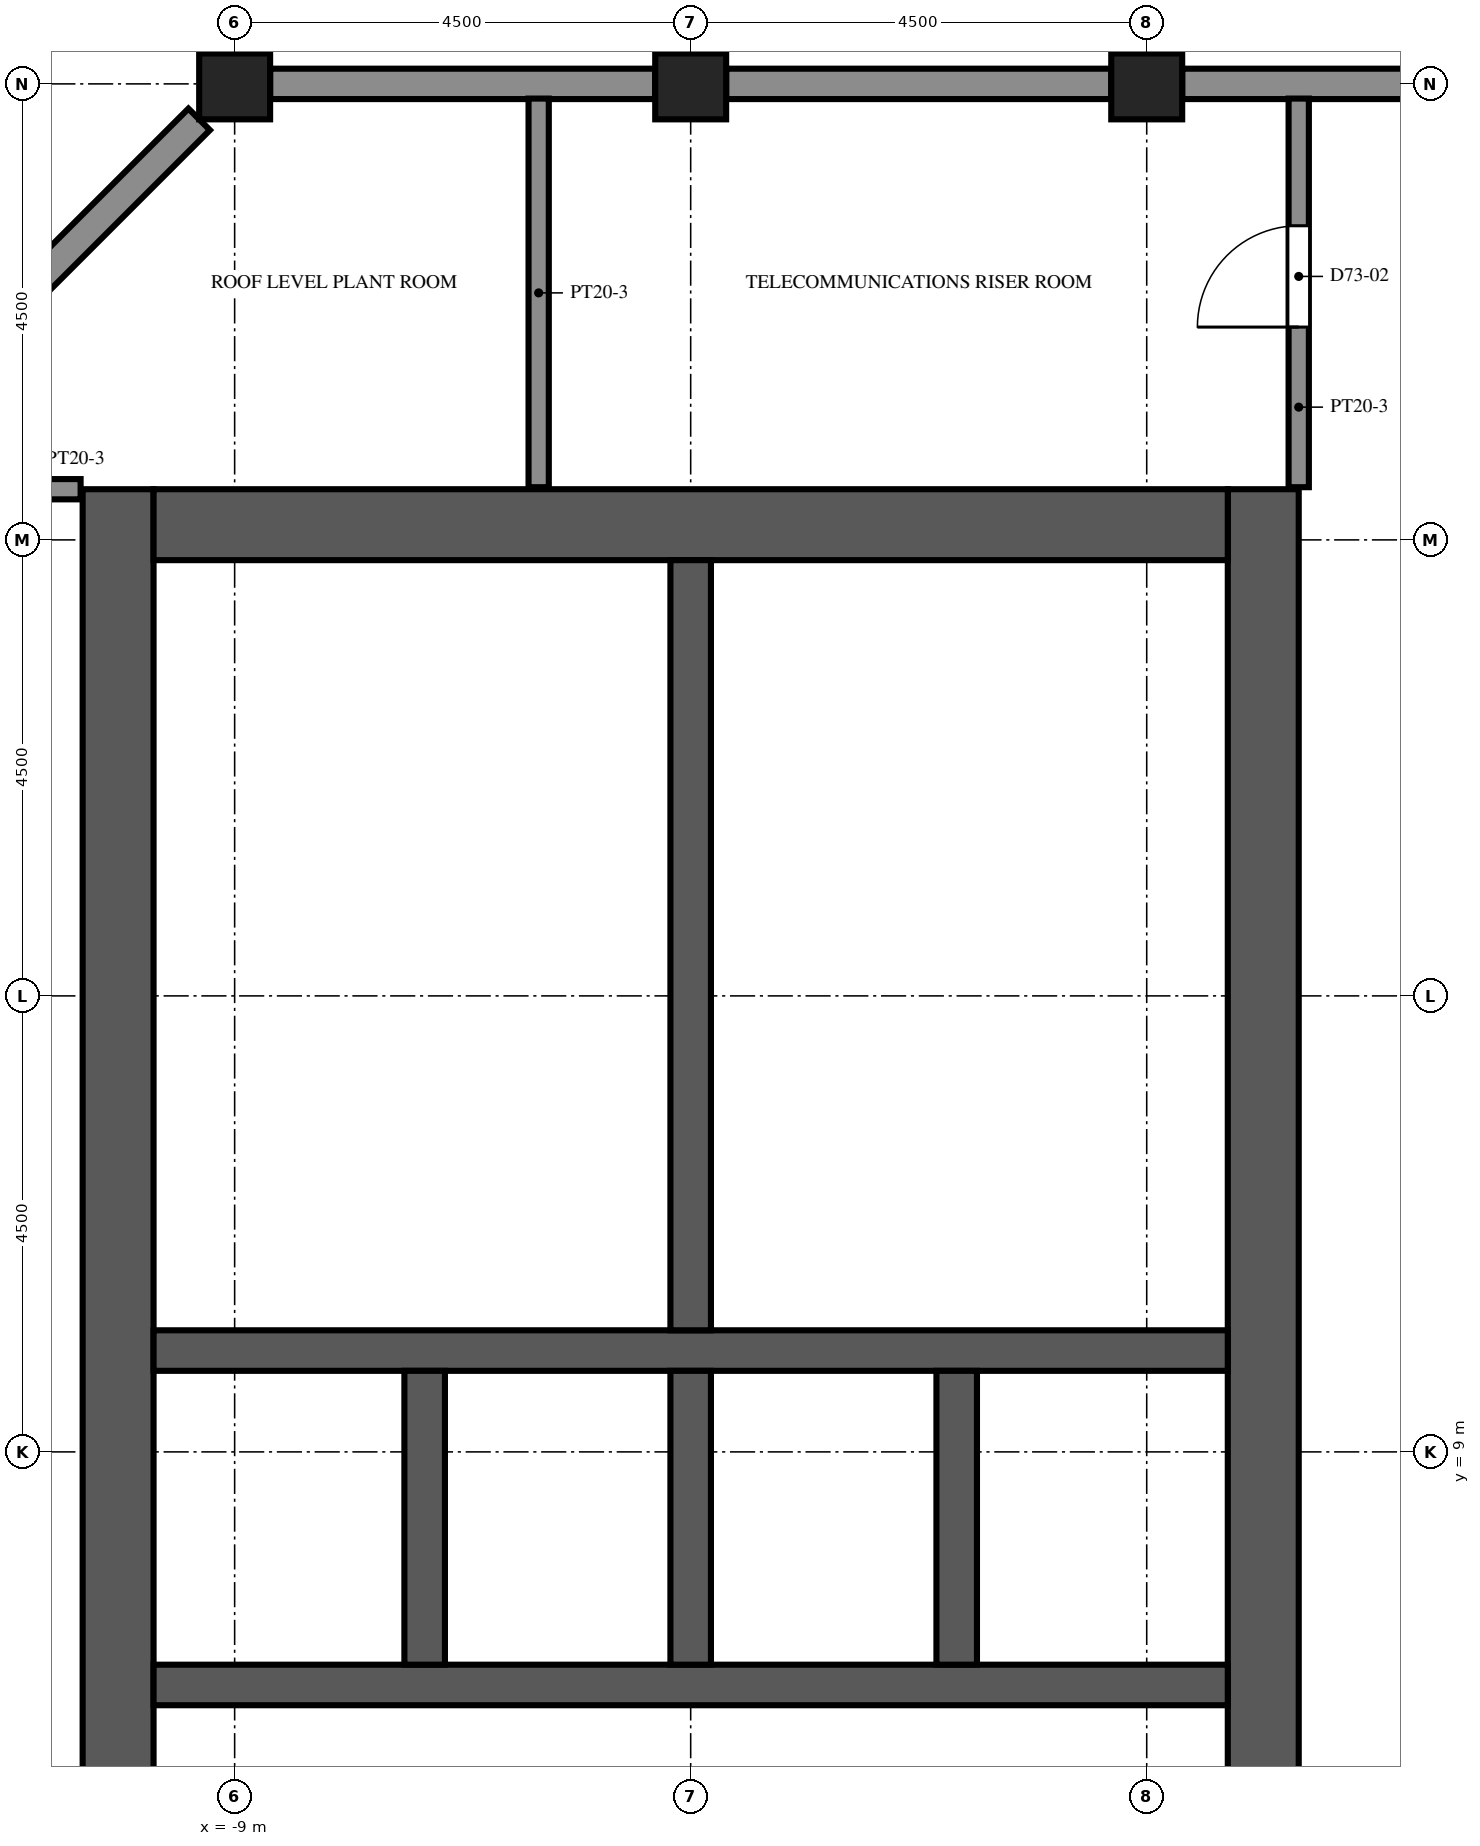
"""IFC4 building model, lengths in metres.
Left out: names, types, materials, properties, quantities, classifications, styles, units other than length and angle.
Written with IfcOpenShell. Run it as: python <this file> out.ifc"""

import sys

from ifc_helpers import new_model, si_unit, direction, frame, frame_2d, origin, origin_2d, place, context, subcontext, project, spatial, rectangle, extrude, element, fill, save


model = new_model("IFC4")
c1 = context("Model", 3, precision=1e-05, world=origin(), true_north=direction((0.0, 1.0)))
c2 = subcontext(c1, "Body", "Model", "MODEL_VIEW")
j1 = project(units=[si_unit("LENGTHUNIT", "METRE"), si_unit("PLANEANGLEUNIT", "RADIAN")], contexts=[c1])
p1 = place(None, origin())
s1 = spatial("IfcSite", under=j1, at=p1, CompositionType="ELEMENT")
p2 = place(p1, origin())
s2 = spatial("IfcBuilding", under=s1, at=p2, CompositionType="ELEMENT")
p3 = place(p2, frame((0.0, 0.0, 326.2)))
s3 = spatial("IfcBuildingStorey", under=s2, at=p3, CompositionType="ELEMENT", Elevation=326.2)
for number, where, z_axis, x_axis in (
    (1, (-9.0, 22.5, 0.0), (0.0, 0.0, 1.0), (1.0, 0.0, 0.0)),
    (2, (-4.5, 22.5, 0.0), (0.0, 0.0, 1.0), (1.0, 0.0, 0.0)),
    (3, (0.0, 22.5, 0.0), (0.0, 0.0, 1.0), (1.0, 0.0, 0.0)),
):
    element("IfcColumn", number, at=place(p3, frame(where, z_axis=z_axis, x_axis=x_axis)), inside=s3, PredefinedType="COLUMN", context=c2, shape_type="SweptSolid", body=[
        extrude(rectangle(XDim=0.7, YDim=0.7, at=origin_2d()), origin(), (0.0, 0.0, 1.0), 3.6),
    ])
p4 = place(p3, frame((-10.15, -9.0, 0.0), z_axis=(0.0, 0.0, 1.0), x_axis=(0.0, 1.0, 0.0)))
e4 = element("IfcWall", 4, at=p4, inside=s3, PredefinedType="SHEAR", context=c2, shape_type="SweptSolid", body=[
    extrude(rectangle(XDim=27.5, YDim=0.7, at=frame_2d((13.75, 0.0))), origin(), (0.0, 0.0, 1.0), 3.2),
])
p5 = place(p4, frame((12.55, 0.0, 0.0)))
e5 = element("IfcOpeningElement", 5, at=p5, cuts=e4, PredefinedType="OPENING", context=c2, shape_type="SweptSolid", body=[
    extrude(rectangle(XDim=2.4, YDim=2.4, at=frame_2d((1.2, 1.2))), frame((0.0, 0.36, 0.0), z_axis=(0.0, -1.0, 0.0), x_axis=(1.0, 0.0, 0.0)), (0.0, 0.0, 1.0), 0.72),
])
p6 = place(p4, frame((6.825, 0.0, 0.0)))
e6 = element("IfcOpeningElement", 6, at=p6, cuts=e4, PredefinedType="OPENING", context=c2, shape_type="SweptSolid", body=[
    extrude(rectangle(XDim=1.2, YDim=2.1, at=frame_2d((0.6, 1.05))), frame((0.0, 0.36, 0.0), z_axis=(0.0, -1.0, 0.0), x_axis=(1.0, 0.0, 0.0)), (0.0, 0.0, 1.0), 0.72),
])
p7 = place(p4, frame((19.475, 0.0, 0.0)))
e7 = element("IfcOpeningElement", 7, at=p7, cuts=e4, PredefinedType="OPENING", context=c2, shape_type="SweptSolid", body=[
    extrude(rectangle(XDim=1.2, YDim=2.1, at=frame_2d((0.6, 1.05))), frame((0.0, 0.36, 0.0), z_axis=(0.0, -1.0, 0.0), x_axis=(1.0, 0.0, 0.0)), (0.0, 0.0, 1.0), 0.72),
])
p8 = place(p3, frame((1.15, -9.0, 0.0), z_axis=(0.0, 0.0, 1.0), x_axis=(0.0, 1.0, 0.0)))
e8 = element("IfcWall", 8, at=p8, inside=s3, PredefinedType="SHEAR", context=c2, shape_type="SweptSolid", body=[
    extrude(rectangle(XDim=27.5, YDim=0.7, at=frame_2d((13.75, 0.0))), origin(), (0.0, 0.0, 1.0), 3.2),
])
p9 = place(p8, frame((12.55, 0.0, 0.0)))
e9 = element("IfcOpeningElement", 9, at=p9, cuts=e8, PredefinedType="OPENING", context=c2, shape_type="SweptSolid", body=[
    extrude(rectangle(XDim=2.4, YDim=2.4, at=frame_2d((1.2, 1.2))), frame((0.0, 0.36, 0.0), z_axis=(0.0, -1.0, 0.0), x_axis=(1.0, 0.0, 0.0)), (0.0, 0.0, 1.0), 0.72),
])
p10 = place(p8, frame((3.9, 0.0, 0.0)))
e10 = element("IfcOpeningElement", 10, at=p10, cuts=e8, PredefinedType="OPENING", context=c2, shape_type="SweptSolid", body=[
    extrude(rectangle(XDim=1.2, YDim=2.1, at=frame_2d((0.6, 1.05))), frame((0.0, 0.36, 0.0), z_axis=(0.0, -1.0, 0.0), x_axis=(1.0, 0.0, 0.0)), (0.0, 0.0, 1.0), 0.72),
])
p11 = place(p8, frame((22.4, 0.0, 0.0)))
e11 = element("IfcOpeningElement", 11, at=p11, cuts=e8, PredefinedType="OPENING", context=c2, shape_type="SweptSolid", body=[
    extrude(rectangle(XDim=1.2, YDim=2.1, at=frame_2d((0.6, 1.05))), frame((0.0, 0.36, 0.0), z_axis=(0.0, -1.0, 0.0), x_axis=(1.0, 0.0, 0.0)), (0.0, 0.0, 1.0), 0.72),
])
p12 = place(p3, frame((-9.8, 18.15, 0.0), z_axis=(0.0, 0.0, 1.0), x_axis=(1.0, 0.0, 0.0)))
e12 = element("IfcWall", 12, at=p12, inside=s3, PredefinedType="SHEAR", context=c2, shape_type="SweptSolid", body=[
    extrude(rectangle(XDim=10.6, YDim=0.7, at=frame_2d((5.3, 0.0))), origin(), (0.0, 0.0, 1.0), 3.2),
])
p13 = place(p3, frame((-9.8, 6.7, 0.0), z_axis=(0.0, 0.0, 1.0), x_axis=(1.0, 0.0, 0.0)))
e13 = element("IfcWall", 13, at=p13, inside=s3, PredefinedType="SHEAR", context=c2, shape_type="SweptSolid", body=[
    extrude(rectangle(XDim=10.6, YDim=0.4, at=frame_2d((5.3, 0.0))), origin(), (0.0, 0.0, 1.0), 3.2),
])
p14 = place(p13, frame((0.738, 0.0, 0.0)))
e14 = element("IfcOpeningElement", 14, at=p14, cuts=e13, PredefinedType="OPENING", context=c2, shape_type="SweptSolid", body=[
    extrude(rectangle(XDim=1.0, YDim=2.1, at=frame_2d((0.5, 1.05))), frame((0.0, 0.21, 0.0), z_axis=(0.0, -1.0, 0.0), x_axis=(1.0, 0.0, 0.0)), (0.0, 0.0, 1.0), 0.42),
])
p15 = place(p13, frame((3.488, 0.0, 0.0)))
e15 = element("IfcOpeningElement", 15, at=p15, cuts=e13, PredefinedType="OPENING", context=c2, shape_type="SweptSolid", body=[
    extrude(rectangle(XDim=1.0, YDim=2.1, at=frame_2d((0.5, 1.05))), frame((0.0, 0.21, 0.0), z_axis=(0.0, -1.0, 0.0), x_axis=(1.0, 0.0, 0.0)), (0.0, 0.0, 1.0), 0.42),
])
p16 = place(p13, frame((6.113, 0.0, 0.0)))
e16 = element("IfcOpeningElement", 16, at=p16, cuts=e13, PredefinedType="OPENING", context=c2, shape_type="SweptSolid", body=[
    extrude(rectangle(XDim=1.0, YDim=2.1, at=frame_2d((0.5, 1.05))), frame((0.0, 0.21, 0.0), z_axis=(0.0, -1.0, 0.0), x_axis=(1.0, 0.0, 0.0)), (0.0, 0.0, 1.0), 0.42),
])
p17 = place(p13, frame((8.863, 0.0, 0.0)))
e17 = element("IfcOpeningElement", 17, at=p17, cuts=e13, PredefinedType="OPENING", context=c2, shape_type="SweptSolid", body=[
    extrude(rectangle(XDim=1.0, YDim=2.1, at=frame_2d((0.5, 1.05))), frame((0.0, 0.21, 0.0), z_axis=(0.0, -1.0, 0.0), x_axis=(1.0, 0.0, 0.0)), (0.0, 0.0, 1.0), 0.42),
])
p18 = place(p3, frame((-9.8, 10.0, 0.0), z_axis=(0.0, 0.0, 1.0), x_axis=(1.0, 0.0, 0.0)))
e18 = element("IfcWall", 18, at=p18, inside=s3, PredefinedType="SHEAR", context=c2, shape_type="SweptSolid", body=[
    extrude(rectangle(XDim=10.6, YDim=0.4, at=frame_2d((5.3, 0.0))), origin(), (0.0, 0.0, 1.0), 3.2),
])
for number, where, z_axis, x_axis in (
    (19, (-7.125, 6.9, 0.0), (0.0, 0.0, 1.0), (0.0, 1.0, 0.0)),
    (20, (-4.5, 6.9, 0.0), (0.0, 0.0, 1.0), (0.0, 1.0, 0.0)),
    (21, (-1.875, 6.9, 0.0), (0.0, 0.0, 1.0), (0.0, 1.0, 0.0)),
):
    element("IfcWall", number, at=place(p3, frame(where, z_axis=z_axis, x_axis=x_axis)), inside=s3, PredefinedType="SHEAR", context=c2, shape_type="SweptSolid", body=[
        extrude(rectangle(XDim=2.9, YDim=0.4, at=frame_2d((1.45, 0.0))), origin(), (0.0, 0.0, 1.0), 3.2),
    ])
p19 = place(p3, frame((-4.5, 10.2, 0.0), z_axis=(0.0, 0.0, 1.0), x_axis=(0.0, 1.0, 0.0)))
e22 = element("IfcWall", 22, at=p19, inside=s3, PredefinedType="SHEAR", context=c2, shape_type="SweptSolid", body=[
    extrude(rectangle(XDim=7.6, YDim=0.4, at=frame_2d((3.8, 0.0))), origin(), (0.0, 0.0, 1.0), 3.2),
])
for number, where, z_axis, x_axis in (
    (23, (4.15, 22.5, 0.0), (0.0, 0.0, 1.0), (-1.0, 0.0, 0.0)),
    (24, (-0.35, 22.5, 0.0), (0.0, 0.0, 1.0), (-1.0, 0.0, 0.0)),
    (25, (-4.85, 22.5, 0.0), (0.0, 0.0, 1.0), (-1.0, 0.0, 0.0)),
):
    element("IfcWall", number, at=place(p3, frame(where, z_axis=z_axis, x_axis=x_axis)), inside=s3, PredefinedType="SOLIDWALL", context=c2, shape_type="SweptSolid", body=[
        extrude(rectangle(XDim=3.8, YDim=0.3, at=frame_2d((1.9, 0.0))), origin(), (0.0, 0.0, 1.0), 0.85),
    ])
p20 = place(p3, frame((-9.35, 22.15, 0.0), z_axis=(0.0, 0.0, 1.0), x_axis=(-0.707106781187, -0.707106781187, 0.0)))
e26 = element("IfcWall", 26, at=p20, inside=s3, PredefinedType="SOLIDWALL", context=c2, shape_type="SweptSolid", body=[
    extrude(rectangle(XDim=5.374, YDim=0.3, at=frame_2d((2.687, 0.0))), origin(), (0.0, 0.0, 1.0), 2.5),
])
p21 = place(p3, frame((-12.795, 18.5, 0.0), z_axis=(0.0, 0.0, 1.0), x_axis=(1.0, 0.0, 0.0)))
e27 = element("IfcWall", 27, at=p21, inside=s3, PredefinedType="PARTITIONING", context=c2, shape_type="SweptSolid", body=[
    extrude(rectangle(XDim=2.275, YDim=0.2, at=frame_2d((1.137, 0.0))), origin(), (0.0, 0.0, 1.0), 3.2),
])
p22 = place(p21, frame((0.595, 0.0, 0.0)))
e28 = element("IfcOpeningElement", 28, at=p22, cuts=e27, PredefinedType="OPENING", context=c2, shape_type="SweptSolid", body=[
    extrude(rectangle(XDim=1.0, YDim=2.1, at=frame_2d((0.5, 1.05))), frame((0.0, 0.11, 0.0), z_axis=(0.0, -1.0, 0.0), x_axis=(1.0, 0.0, 0.0)), (0.0, 0.0, 1.0), 0.22),
])
p23 = place(p3, frame((-6.0, 22.355, 0.0), z_axis=(0.0, 0.0, 1.0), x_axis=(0.0, -1.0, 0.0)))
e29 = element("IfcWall", 29, at=p23, inside=s3, PredefinedType="PARTITIONING", context=c2, shape_type="SweptSolid", body=[
    extrude(rectangle(XDim=3.835, YDim=0.2, at=frame_2d((1.917, 0.0))), origin(), (0.0, 0.0, 1.0), 3.2),
])
p24 = place(p3, frame((1.5, 18.52, 0.0), z_axis=(0.0, 0.0, 1.0), x_axis=(0.0, 1.0, 0.0)))
e30 = element("IfcWall", 30, at=p24, inside=s3, PredefinedType="PARTITIONING", context=c2, shape_type="SweptSolid", body=[
    extrude(rectangle(XDim=3.835, YDim=0.2, at=frame_2d((1.917, 0.0))), origin(), (0.0, 0.0, 1.0), 3.2),
])
p25 = place(p24, frame((1.58, 0.0, 0.0)))
e31 = element("IfcOpeningElement", 31, at=p25, cuts=e30, PredefinedType="OPENING", context=c2, shape_type="SweptSolid", body=[
    extrude(rectangle(XDim=1.0, YDim=2.1, at=frame_2d((0.5, 1.05))), frame((0.0, 0.11, 0.0), z_axis=(0.0, -1.0, 0.0), x_axis=(1.0, 0.0, 0.0)), (0.0, 0.0, 1.0), 0.22),
])
p26 = place(p3, frame((-0.6, 10.2, 0.0), z_axis=(0.0, 0.0, 1.0), x_axis=(0.0, 1.0, 0.0)))
e32 = element("IfcWall", 32, at=p26, inside=s3, PredefinedType="PARTITIONING", context=c2, shape_type="SweptSolid", body=[
    extrude(rectangle(XDim=2.28, YDim=0.1, at=frame_2d((1.14, 0.0))), origin(), (0.0, 0.0, 1.0), 3.2),
])
p27 = place(p26, frame((0.64, 0.0, 0.0)))
e33 = element("IfcOpeningElement", 33, at=p27, cuts=e32, PredefinedType="OPENING", context=c2, shape_type="SweptSolid", body=[
    extrude(rectangle(XDim=1.0, YDim=2.1, at=frame_2d((0.5, 1.05))), frame((0.0, 0.06, 0.0), z_axis=(0.0, -1.0, 0.0), x_axis=(1.0, 0.0, 0.0)), (0.0, 0.0, 1.0), 0.12),
])
p28 = place(p3, frame((-0.6, 12.48, 0.0), z_axis=(0.0, 0.0, 1.0), x_axis=(0.0, 1.0, 0.0)))
e34 = element("IfcWall", 34, at=p28, inside=s3, PredefinedType="PARTITIONING", context=c2, shape_type="SweptSolid", body=[
    extrude(rectangle(XDim=2.432, YDim=0.1, at=frame_2d((1.216, 0.0))), origin(), (0.0, 0.0, 1.0), 3.2),
])
p29 = place(p28, frame((0.716, 0.0, 0.0)))
e35 = element("IfcOpeningElement", 35, at=p29, cuts=e34, PredefinedType="OPENING", context=c2, shape_type="SweptSolid", body=[
    extrude(rectangle(XDim=1.0, YDim=2.1, at=frame_2d((0.5, 1.05))), frame((0.0, 0.06, 0.0), z_axis=(0.0, -1.0, 0.0), x_axis=(1.0, 0.0, 0.0)), (0.0, 0.0, 1.0), 0.12),
])
p30 = place(p3, frame((-0.6, 14.912, 0.0), z_axis=(0.0, 0.0, 1.0), x_axis=(0.0, 1.0, 0.0)))
e36 = element("IfcWall", 36, at=p30, inside=s3, PredefinedType="PARTITIONING", context=c2, shape_type="SweptSolid", body=[
    extrude(rectangle(XDim=2.888, YDim=0.1, at=frame_2d((1.444, 0.0))), origin(), (0.0, 0.0, 1.0), 3.2),
])
p31 = place(p30, frame((0.944, 0.0, 0.0)))
e37 = element("IfcOpeningElement", 37, at=p31, cuts=e36, PredefinedType="OPENING", context=c2, shape_type="SweptSolid", body=[
    extrude(rectangle(XDim=1.0, YDim=2.1, at=frame_2d((0.5, 1.05))), frame((0.0, 0.06, 0.0), z_axis=(0.0, -1.0, 0.0), x_axis=(1.0, 0.0, 0.0)), (0.0, 0.0, 1.0), 0.12),
])
for number, where, z_axis, x_axis in (
    (38, (-4.3, 12.48, 0.0), (0.0, 0.0, 1.0), (1.0, 0.0, 0.0)),
    (39, (-4.3, 14.912, 0.0), (0.0, 0.0, 1.0), (1.0, 0.0, 0.0)),
):
    element("IfcWall", number, at=place(p3, frame(where, z_axis=z_axis, x_axis=x_axis)), inside=s3, PredefinedType="PARTITIONING", context=c2, shape_type="SweptSolid", body=[
        extrude(rectangle(XDim=3.7, YDim=0.1, at=frame_2d((1.85, 0.0))), origin(), (0.0, 0.0, 1.0), 3.2),
    ])
p32 = place(p25, origin())
e40 = element("IfcDoor", 40, at=p32, inside=s3, OperationType="SINGLE_SWING_LEFT", PredefinedType="DOOR", context=c2, shape_type="SweptSolid", body=[
    extrude(rectangle(XDim=1.0, YDim=2.1, at=frame_2d((0.5, 1.05))), frame((0.0, 0.025, 0.0), z_axis=(0.0, -1.0, 0.0), x_axis=(1.0, 0.0, 0.0)), (0.0, 0.0, 1.0), 0.05),
])
fill(e31, e40)
p33 = place(p5, origin())
e41 = element("IfcDoor", 41, at=p33, inside=s3, OperationType="DOUBLE_DOOR_DOUBLE_SWING", PredefinedType="DOOR", context=c2, shape_type="SweptSolid", body=[
    extrude(rectangle(XDim=2.4, YDim=2.4, at=frame_2d((1.2, 1.2))), frame((0.0, 0.025, 0.0), z_axis=(0.0, -1.0, 0.0), x_axis=(1.0, 0.0, 0.0)), (0.0, 0.0, 1.0), 0.05),
])
fill(e5, e41)
p34 = place(p9, origin())
e42 = element("IfcDoor", 42, at=p34, inside=s3, OperationType="DOUBLE_DOOR_DOUBLE_SWING", PredefinedType="DOOR", context=c2, shape_type="SweptSolid", body=[
    extrude(rectangle(XDim=2.4, YDim=2.4, at=frame_2d((1.2, 1.2))), frame((0.0, 0.025, 0.0), z_axis=(0.0, -1.0, 0.0), x_axis=(1.0, 0.0, 0.0)), (0.0, 0.0, 1.0), 0.05),
])
fill(e9, e42)
p35 = place(p7, origin())
e43 = element("IfcDoor", 43, at=p35, inside=s3, OperationType="SINGLE_SWING_LEFT", PredefinedType="DOOR", context=c2, shape_type="SweptSolid", body=[
    extrude(rectangle(XDim=1.2, YDim=2.1, at=frame_2d((0.6, 1.05))), frame((0.0, 0.025, 0.0), z_axis=(0.0, -1.0, 0.0), x_axis=(1.0, 0.0, 0.0)), (0.0, 0.0, 1.0), 0.05),
])
fill(e7, e43)
p36 = place(p14, origin())
e44 = element("IfcDoor", 44, at=p36, inside=s3, OperationType="SINGLE_SWING_LEFT", PredefinedType="DOOR", context=c2, shape_type="SweptSolid", body=[
    extrude(rectangle(XDim=1.0, YDim=2.1, at=frame_2d((0.5, 1.05))), frame((0.0, 0.025, 0.0), z_axis=(0.0, -1.0, 0.0), x_axis=(1.0, 0.0, 0.0)), (0.0, 0.0, 1.0), 0.05),
])
fill(e14, e44)
p37 = place(p15, origin())
e45 = element("IfcDoor", 45, at=p37, inside=s3, OperationType="SINGLE_SWING_RIGHT", PredefinedType="DOOR", context=c2, shape_type="SweptSolid", body=[
    extrude(rectangle(XDim=1.0, YDim=2.1, at=frame_2d((0.5, 1.05))), frame((0.0, 0.025, 0.0), z_axis=(0.0, -1.0, 0.0), x_axis=(1.0, 0.0, 0.0)), (0.0, 0.0, 1.0), 0.05),
])
fill(e15, e45)
p38 = place(p16, origin())
e46 = element("IfcDoor", 46, at=p38, inside=s3, OperationType="SINGLE_SWING_LEFT", PredefinedType="DOOR", context=c2, shape_type="SweptSolid", body=[
    extrude(rectangle(XDim=1.0, YDim=2.1, at=frame_2d((0.5, 1.05))), frame((0.0, 0.025, 0.0), z_axis=(0.0, -1.0, 0.0), x_axis=(1.0, 0.0, 0.0)), (0.0, 0.0, 1.0), 0.05),
])
fill(e16, e46)
p39 = place(p17, origin())
e47 = element("IfcDoor", 47, at=p39, inside=s3, OperationType="SINGLE_SWING_RIGHT", PredefinedType="DOOR", context=c2, shape_type="SweptSolid", body=[
    extrude(rectangle(XDim=1.0, YDim=2.1, at=frame_2d((0.5, 1.05))), frame((0.0, 0.025, 0.0), z_axis=(0.0, -1.0, 0.0), x_axis=(1.0, 0.0, 0.0)), (0.0, 0.0, 1.0), 0.05),
])
fill(e17, e47)
p40 = place(p11, origin())
e48 = element("IfcDoor", 48, at=p40, inside=s3, OperationType="SINGLE_SWING_LEFT", PredefinedType="DOOR", context=c2, shape_type="SweptSolid", body=[
    extrude(rectangle(XDim=1.2, YDim=2.1, at=frame_2d((0.6, 1.05))), frame((0.0, 0.325, 0.0), z_axis=(0.0, -1.0, 0.0), x_axis=(1.0, 0.0, 0.0)), (0.0, 0.0, 1.0), 0.05),
])
fill(e11, e48)
p41 = place(p27, origin())
e49 = element("IfcDoor", 49, at=p41, inside=s3, OperationType="SINGLE_SWING_RIGHT", PredefinedType="DOOR", context=c2, shape_type="SweptSolid", body=[
    extrude(rectangle(XDim=1.0, YDim=2.1, at=frame_2d((0.5, 1.05))), frame((0.0, 0.025, 0.0), z_axis=(0.0, -1.0, 0.0), x_axis=(1.0, 0.0, 0.0)), (0.0, 0.0, 1.0), 0.05),
])
fill(e33, e49)
p42 = place(p29, origin())
e50 = element("IfcDoor", 50, at=p42, inside=s3, OperationType="SINGLE_SWING_LEFT", PredefinedType="DOOR", context=c2, shape_type="SweptSolid", body=[
    extrude(rectangle(XDim=1.0, YDim=2.1, at=frame_2d((0.5, 1.05))), frame((0.0, 0.025, 0.0), z_axis=(0.0, -1.0, 0.0), x_axis=(1.0, 0.0, 0.0)), (0.0, 0.0, 1.0), 0.05),
])
fill(e35, e50)
p43 = place(p31, origin())
e51 = element("IfcDoor", 51, at=p43, inside=s3, OperationType="SINGLE_SWING_RIGHT", PredefinedType="DOOR", context=c2, shape_type="SweptSolid", body=[
    extrude(rectangle(XDim=1.0, YDim=2.1, at=frame_2d((0.5, 1.05))), frame((0.0, 0.025, 0.0), z_axis=(0.0, -1.0, 0.0), x_axis=(1.0, 0.0, 0.0)), (0.0, 0.0, 1.0), 0.05),
])
fill(e37, e51)
save(model, sys.argv[1])
